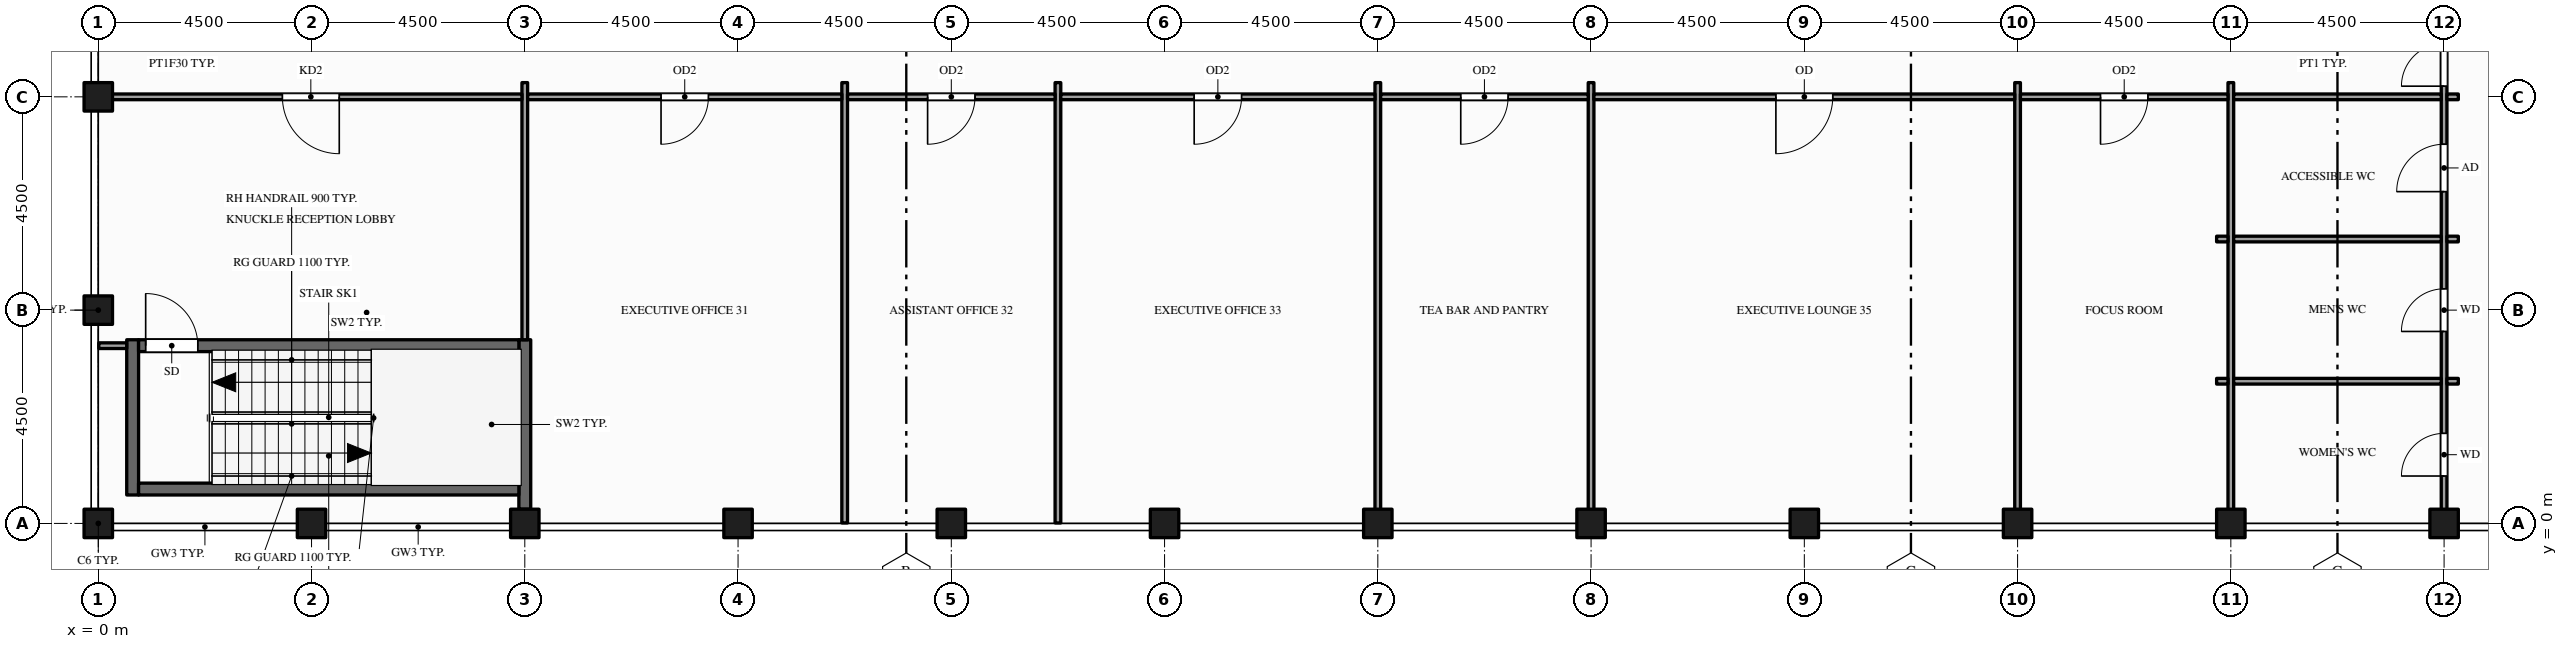
"""IFC4 building model, lengths in metres.
Left out: names, types, materials, properties, quantities, classifications, styles, units other than length and angle.
Written with IfcOpenShell. Run it as: python <this file> out.ifc"""

import sys

from ifc_helpers import new_model, si_unit, direction, frame, frame_2d, origin, origin_2d, place, context, subcontext, project, spatial, rectangle, hollow_rectangle, extrude, element, fill, save


model = new_model("IFC4")
c1 = context("Model", 3, precision=1e-05, world=origin(), true_north=direction((0.0, 1.0)))
c2 = subcontext(c1, "Body", "Model", "MODEL_VIEW")
j1 = project(units=[si_unit("LENGTHUNIT", "METRE"), si_unit("PLANEANGLEUNIT", "RADIAN")], contexts=[c1])
p1 = place(None, origin())
s1 = spatial("IfcSite", under=j1, at=p1, CompositionType="ELEMENT")
p2 = place(p1, origin())
s2 = spatial("IfcBuilding", under=s1, at=p2, CompositionType="ELEMENT")
p3 = place(p2, frame((0.0, 0.0, 332.0)))
s3 = spatial("IfcBuildingStorey", under=s2, at=p3, CompositionType="ELEMENT", Elevation=332.0)
for number, where, z_axis, x_axis in (
    (1, (0.0, 0.0, -0.15), (0.0, 0.0, 1.0), (1.0, 0.0, 0.0)),
    (2, (0.0, 4.5, -0.15), (0.0, 0.0, 1.0), (1.0, 0.0, 0.0)),
    (3, (0.0, 9.0, -0.15), (0.0, 0.0, 1.0), (1.0, 0.0, 0.0)),
    (4, (4.5, 0.0, -0.15), (0.0, 0.0, 1.0), (1.0, 0.0, 0.0)),
    (5, (9.0, 0.0, -0.15), (0.0, 0.0, 1.0), (1.0, 0.0, 0.0)),
    (6, (13.5, 0.0, -0.15), (0.0, 0.0, 1.0), (1.0, 0.0, 0.0)),
    (7, (18.0, 0.0, -0.15), (0.0, 0.0, 1.0), (1.0, 0.0, 0.0)),
    (8, (22.5, 0.0, -0.15), (0.0, 0.0, 1.0), (1.0, 0.0, 0.0)),
    (9, (27.0, 0.0, -0.15), (0.0, 0.0, 1.0), (1.0, 0.0, 0.0)),
    (10, (31.5, 0.0, -0.15), (0.0, 0.0, 1.0), (1.0, 0.0, 0.0)),
    (11, (36.0, 0.0, -0.15), (0.0, 0.0, 1.0), (1.0, 0.0, 0.0)),
    (12, (40.5, 0.0, -0.15), (0.0, 0.0, 1.0), (1.0, 0.0, 0.0)),
    (13, (45.0, 0.0, -0.15), (0.0, 0.0, 1.0), (1.0, 0.0, 0.0)),
    (14, (49.5, 0.0, -0.15), (0.0, 0.0, 1.0), (1.0, 0.0, 0.0)),
):
    element("IfcColumn", number, at=place(p3, frame(where, z_axis=z_axis, x_axis=x_axis)), inside=s3, PredefinedType="COLUMN", context=c2, shape_type="SweptSolid", body=[
        extrude(hollow_rectangle(XDim=0.6, YDim=0.6, WallThickness=0.03, at=origin_2d()), origin(), (0.0, 0.0, 1.0), 4.5),
    ])
p4 = place(p3, frame((0.725, 0.6, 0.0), z_axis=(0.0, 0.0, 1.0), x_axis=(0.0, 1.0, 0.0)))
e15 = element("IfcWall", 15, at=p4, inside=s3, PredefinedType="SHEAR", context=c2, shape_type="SweptSolid", body=[
    extrude(rectangle(XDim=3.275, YDim=0.25, at=frame_2d((1.637, 0.0))), origin(), (0.0, 0.0, 1.0), 4.35),
])
p5 = place(p3, frame((9.0, 0.3, 0.0), z_axis=(0.0, 0.0, 1.0), x_axis=(0.0, 1.0, 0.0)))
e16 = element("IfcWall", 16, at=p5, inside=s3, PredefinedType="SHEAR", context=c2, shape_type="SweptSolid", body=[
    extrude(rectangle(XDim=3.575, YDim=0.25, at=frame_2d((1.788, 0.0))), origin(), (0.0, 0.0, 1.0), 4.35),
])
p6 = place(p3, frame((9.0, 3.875, 0.0), z_axis=(0.0, 0.0, 1.0), x_axis=(0.0, 1.0, 0.0)))
e17 = element("IfcWall", 17, at=p6, inside=s3, PredefinedType="PARTITIONING", context=c2, shape_type="SweptSolid", body=[
    extrude(rectangle(XDim=5.425, YDim=0.12, at=frame_2d((2.712, 0.0))), origin(), (0.0, 0.0, 1.0), 3.359),
])
for number, where, z_axis, x_axis in (
    (18, (15.75, 0.01, 0.0), (0.0, 0.0, 1.0), (0.0, 1.0, 0.0)),
    (19, (20.25, 0.01, 0.0), (0.0, 0.0, 1.0), (0.0, 1.0, 0.0)),
    (20, (27.0, 0.01, 0.0), (0.0, 0.0, 1.0), (0.0, 1.0, 0.0)),
    (21, (31.5, 0.01, 0.0), (0.0, 0.0, 1.0), (0.0, 1.0, 0.0)),
    (22, (40.5, 0.01, 0.0), (0.0, 0.0, 1.0), (0.0, 1.0, 0.0)),
    (23, (45.0, 0.01, 0.0), (0.0, 0.0, 1.0), (0.0, 1.0, 0.0)),
):
    element("IfcWall", number, at=place(p3, frame(where, z_axis=z_axis, x_axis=x_axis)), inside=s3, PredefinedType="PARTITIONING", context=c2, shape_type="SweptSolid", body=[
        extrude(rectangle(XDim=9.29, YDim=0.12, at=frame_2d((4.645, 0.0))), origin(), (0.0, 0.0, 1.0), 3.359),
    ])
p7 = place(p3, frame((49.5, 0.01, 0.0), z_axis=(0.0, 0.0, 1.0), x_axis=(0.0, 1.0, 0.0)))
e24 = element("IfcWall", 24, at=p7, inside=s3, PredefinedType="PARTITIONING", context=c2, shape_type="SweptSolid", body=[
    extrude(rectangle(XDim=22.48, YDim=0.12, at=frame_2d((11.24, 0.0))), origin(), (0.0, 0.0, 1.0), 3.359),
])
p8 = place(p7, frame((9.215, 0.0, 0.0)))
e25 = element("IfcOpeningElement", 25, at=p8, cuts=e24, PredefinedType="OPENING", context=c2, shape_type="SweptSolid", body=[
    extrude(rectangle(XDim=1.8, YDim=2.1, at=frame_2d((0.9, 1.05))), frame((0.0, 0.07, 0.0), z_axis=(0.0, -1.0, 0.0), x_axis=(1.0, 0.0, 0.0)), (0.0, 0.0, 1.0), 0.14),
])
p9 = place(p7, frame((0.99, 0.0, 0.0)))
e26 = element("IfcOpeningElement", 26, at=p9, cuts=e24, PredefinedType="OPENING", context=c2, shape_type="SweptSolid", body=[
    extrude(rectangle(XDim=0.9, YDim=2.1, at=frame_2d((0.45, 1.05))), frame((0.0, 0.07, 0.0), z_axis=(0.0, -1.0, 0.0), x_axis=(1.0, 0.0, 0.0)), (0.0, 0.0, 1.0), 0.14),
])
p10 = place(p7, frame((4.04, 0.0, 0.0)))
e27 = element("IfcOpeningElement", 27, at=p10, cuts=e24, PredefinedType="OPENING", context=c2, shape_type="SweptSolid", body=[
    extrude(rectangle(XDim=0.9, YDim=2.1, at=frame_2d((0.45, 1.05))), frame((0.0, 0.07, 0.0), z_axis=(0.0, -1.0, 0.0), x_axis=(1.0, 0.0, 0.0)), (0.0, 0.0, 1.0), 0.14),
])
p11 = place(p7, frame((6.99, 0.0, 0.0)))
e28 = element("IfcOpeningElement", 28, at=p11, cuts=e24, PredefinedType="OPENING", context=c2, shape_type="SweptSolid", body=[
    extrude(rectangle(XDim=1.0, YDim=2.1, at=frame_2d((0.5, 1.05))), frame((0.0, 0.07, 0.0), z_axis=(0.0, -1.0, 0.0), x_axis=(1.0, 0.0, 0.0)), (0.0, 0.0, 1.0), 0.14),
])
p12 = place(p3, frame((0.85, 0.725, 0.0), z_axis=(0.0, 0.0, 1.0), x_axis=(1.0, 0.0, 0.0)))
e29 = element("IfcWall", 29, at=p12, inside=s3, PredefinedType="SHEAR", context=c2, shape_type="SweptSolid", body=[
    extrude(rectangle(XDim=8.025, YDim=0.25, at=frame_2d((4.012, 0.0))), origin(), (0.0, 0.0, 1.0), 4.35),
])
p13 = place(p3, frame((44.7, 3.0, 0.0), z_axis=(0.0, 0.0, 1.0), x_axis=(1.0, 0.0, 0.0)))
e30 = element("IfcWall", 30, at=p13, inside=s3, PredefinedType="PARTITIONING", context=c2, shape_type="SweptSolid", body=[
    extrude(rectangle(XDim=0.24, YDim=0.12, at=frame_2d((0.12, 0.0))), origin(), (0.0, 0.0, 1.0), 3.359),
])
p14 = place(p3, frame((45.06, 3.0, 0.0), z_axis=(0.0, 0.0, 1.0), x_axis=(1.0, 0.0, 0.0)))
e31 = element("IfcWall", 31, at=p14, inside=s3, PredefinedType="PARTITIONING", context=c2, shape_type="SweptSolid", body=[
    extrude(rectangle(XDim=4.38, YDim=0.12, at=frame_2d((2.19, 0.0))), origin(), (0.0, 0.0, 1.0), 3.359),
])
p15 = place(p3, frame((49.56, 3.0, 0.0), z_axis=(0.0, 0.0, 1.0), x_axis=(1.0, 0.0, 0.0)))
e32 = element("IfcWall", 32, at=p15, inside=s3, PredefinedType="PARTITIONING", context=c2, shape_type="SweptSolid", body=[
    extrude(rectangle(XDim=0.24, YDim=0.12, at=frame_2d((0.12, 0.0))), origin(), (0.0, 0.0, 1.0), 3.359),
])
p16 = place(p3, frame((0.01, 3.75, 0.0), z_axis=(0.0, 0.0, 1.0), x_axis=(1.0, 0.0, 0.0)))
e33 = element("IfcWall", 33, at=p16, inside=s3, PredefinedType="PARTITIONING", context=c2, shape_type="SweptSolid", body=[
    extrude(rectangle(XDim=0.59, YDim=0.12, at=frame_2d((0.295, 0.0))), origin(), (0.0, 0.0, 1.0), 3.672),
])
p17 = place(p3, frame((0.85, 3.75, 0.0), z_axis=(0.0, 0.0, 1.0), x_axis=(1.0, 0.0, 0.0)))
e34 = element("IfcWall", 34, at=p17, inside=s3, PredefinedType="SHEAR", context=c2, shape_type="SweptSolid", body=[
    extrude(rectangle(XDim=8.025, YDim=0.25, at=frame_2d((4.012, 0.0))), origin(), (0.0, 0.0, 1.0), 4.35),
])
p18 = place(p17, frame((0.15, 0.0, 0.0)))
e35 = element("IfcOpeningElement", 35, at=p18, cuts=e34, PredefinedType="OPENING", context=c2, shape_type="SweptSolid", body=[
    extrude(rectangle(XDim=1.1, YDim=2.1, at=frame_2d((0.55, 1.05))), frame((0.0, 0.135, 0.0), z_axis=(0.0, -1.0, 0.0), x_axis=(1.0, 0.0, 0.0)), (0.0, 0.0, 1.0), 0.27),
])
p19 = place(p3, frame((44.7, 6.0, 0.0), z_axis=(0.0, 0.0, 1.0), x_axis=(1.0, 0.0, 0.0)))
e36 = element("IfcWall", 36, at=p19, inside=s3, PredefinedType="PARTITIONING", context=c2, shape_type="SweptSolid", body=[
    extrude(rectangle(XDim=0.24, YDim=0.12, at=frame_2d((0.12, 0.0))), origin(), (0.0, 0.0, 1.0), 3.359),
])
p20 = place(p3, frame((45.06, 6.0, 0.0), z_axis=(0.0, 0.0, 1.0), x_axis=(1.0, 0.0, 0.0)))
e37 = element("IfcWall", 37, at=p20, inside=s3, PredefinedType="PARTITIONING", context=c2, shape_type="SweptSolid", body=[
    extrude(rectangle(XDim=4.38, YDim=0.12, at=frame_2d((2.19, 0.0))), origin(), (0.0, 0.0, 1.0), 3.359),
])
p21 = place(p3, frame((49.56, 6.0, 0.0), z_axis=(0.0, 0.0, 1.0), x_axis=(1.0, 0.0, 0.0)))
e38 = element("IfcWall", 38, at=p21, inside=s3, PredefinedType="PARTITIONING", context=c2, shape_type="SweptSolid", body=[
    extrude(rectangle(XDim=0.24, YDim=0.12, at=frame_2d((0.12, 0.0))), origin(), (0.0, 0.0, 1.0), 3.359),
])
p22 = place(p3, frame((0.01, 9.0, 0.0), z_axis=(0.0, 0.0, 1.0), x_axis=(1.0, 0.0, 0.0)))
e39 = element("IfcWall", 39, at=p22, inside=s3, PredefinedType="PARTITIONING", context=c2, shape_type="SweptSolid", body=[
    extrude(rectangle(XDim=8.93, YDim=0.12, at=frame_2d((4.465, 0.0))), origin(), (0.0, 0.0, 1.0), 3.359),
])
p23 = place(p22, frame((3.875, 0.0, 0.0)))
e40 = element("IfcOpeningElement", 40, at=p23, cuts=e39, PredefinedType="OPENING", context=c2, shape_type="SweptSolid", body=[
    extrude(rectangle(XDim=1.2, YDim=2.1, at=frame_2d((0.6, 1.05))), frame((0.0, 0.07, 0.0), z_axis=(0.0, -1.0, 0.0), x_axis=(1.0, 0.0, 0.0)), (0.0, 0.0, 1.0), 0.14),
])
p24 = place(p3, frame((9.06, 9.0, 0.0), z_axis=(0.0, 0.0, 1.0), x_axis=(1.0, 0.0, 0.0)))
e41 = element("IfcWall", 41, at=p24, inside=s3, PredefinedType="PARTITIONING", context=c2, shape_type="SweptSolid", body=[
    extrude(rectangle(XDim=6.63, YDim=0.12, at=frame_2d((3.315, 0.0))), origin(), (0.0, 0.0, 1.0), 3.359),
])
p25 = place(p24, frame((2.815, 0.0, 0.0)))
e42 = element("IfcOpeningElement", 42, at=p25, cuts=e41, PredefinedType="OPENING", context=c2, shape_type="SweptSolid", body=[
    extrude(rectangle(XDim=1.0, YDim=2.1, at=frame_2d((0.5, 1.05))), frame((0.0, 0.07, 0.0), z_axis=(0.0, -1.0, 0.0), x_axis=(1.0, 0.0, 0.0)), (0.0, 0.0, 1.0), 0.14),
])
p26 = place(p3, frame((15.81, 9.0, 0.0), z_axis=(0.0, 0.0, 1.0), x_axis=(1.0, 0.0, 0.0)))
e43 = element("IfcWall", 43, at=p26, inside=s3, PredefinedType="PARTITIONING", context=c2, shape_type="SweptSolid", body=[
    extrude(rectangle(XDim=4.38, YDim=0.12, at=frame_2d((2.19, 0.0))), origin(), (0.0, 0.0, 1.0), 3.359),
])
p27 = place(p26, frame((1.69, 0.0, 0.0)))
e44 = element("IfcOpeningElement", 44, at=p27, cuts=e43, PredefinedType="OPENING", context=c2, shape_type="SweptSolid", body=[
    extrude(rectangle(XDim=1.0, YDim=2.1, at=frame_2d((0.5, 1.05))), frame((0.0, 0.07, 0.0), z_axis=(0.0, -1.0, 0.0), x_axis=(1.0, 0.0, 0.0)), (0.0, 0.0, 1.0), 0.14),
])
p28 = place(p3, frame((20.31, 9.0, 0.0), z_axis=(0.0, 0.0, 1.0), x_axis=(1.0, 0.0, 0.0)))
e45 = element("IfcWall", 45, at=p28, inside=s3, PredefinedType="PARTITIONING", context=c2, shape_type="SweptSolid", body=[
    extrude(rectangle(XDim=6.63, YDim=0.12, at=frame_2d((3.315, 0.0))), origin(), (0.0, 0.0, 1.0), 3.359),
])
p29 = place(p28, frame((2.815, 0.0, 0.0)))
e46 = element("IfcOpeningElement", 46, at=p29, cuts=e45, PredefinedType="OPENING", context=c2, shape_type="SweptSolid", body=[
    extrude(rectangle(XDim=1.0, YDim=2.1, at=frame_2d((0.5, 1.05))), frame((0.0, 0.07, 0.0), z_axis=(0.0, -1.0, 0.0), x_axis=(1.0, 0.0, 0.0)), (0.0, 0.0, 1.0), 0.14),
])
p30 = place(p3, frame((27.06, 9.0, 0.0), z_axis=(0.0, 0.0, 1.0), x_axis=(1.0, 0.0, 0.0)))
e47 = element("IfcWall", 47, at=p30, inside=s3, PredefinedType="PARTITIONING", context=c2, shape_type="SweptSolid", body=[
    extrude(rectangle(XDim=4.38, YDim=0.12, at=frame_2d((2.19, 0.0))), origin(), (0.0, 0.0, 1.0), 3.359),
])
p31 = place(p30, frame((1.69, 0.0, 0.0)))
e48 = element("IfcOpeningElement", 48, at=p31, cuts=e47, PredefinedType="OPENING", context=c2, shape_type="SweptSolid", body=[
    extrude(rectangle(XDim=1.0, YDim=2.1, at=frame_2d((0.5, 1.05))), frame((0.0, 0.07, 0.0), z_axis=(0.0, -1.0, 0.0), x_axis=(1.0, 0.0, 0.0)), (0.0, 0.0, 1.0), 0.14),
])
p32 = place(p3, frame((31.56, 9.0, 0.0), z_axis=(0.0, 0.0, 1.0), x_axis=(1.0, 0.0, 0.0)))
e49 = element("IfcWall", 49, at=p32, inside=s3, PredefinedType="PARTITIONING", context=c2, shape_type="SweptSolid", body=[
    extrude(rectangle(XDim=8.88, YDim=0.12, at=frame_2d((4.44, 0.0))), origin(), (0.0, 0.0, 1.0), 3.359),
])
p33 = place(p32, frame((3.84, 0.0, 0.0)))
e50 = element("IfcOpeningElement", 50, at=p33, cuts=e49, PredefinedType="OPENING", context=c2, shape_type="SweptSolid", body=[
    extrude(rectangle(XDim=1.2, YDim=2.1, at=frame_2d((0.6, 1.05))), frame((0.0, 0.07, 0.0), z_axis=(0.0, -1.0, 0.0), x_axis=(1.0, 0.0, 0.0)), (0.0, 0.0, 1.0), 0.14),
])
p34 = place(p3, frame((40.56, 9.0, 0.0), z_axis=(0.0, 0.0, 1.0), x_axis=(1.0, 0.0, 0.0)))
e51 = element("IfcWall", 51, at=p34, inside=s3, PredefinedType="PARTITIONING", context=c2, shape_type="SweptSolid", body=[
    extrude(rectangle(XDim=4.38, YDim=0.12, at=frame_2d((2.19, 0.0))), origin(), (0.0, 0.0, 1.0), 3.359),
])
p35 = place(p34, frame((1.69, 0.0, 0.0)))
e52 = element("IfcOpeningElement", 52, at=p35, cuts=e51, PredefinedType="OPENING", context=c2, shape_type="SweptSolid", body=[
    extrude(rectangle(XDim=1.0, YDim=2.1, at=frame_2d((0.5, 1.05))), frame((0.0, 0.07, 0.0), z_axis=(0.0, -1.0, 0.0), x_axis=(1.0, 0.0, 0.0)), (0.0, 0.0, 1.0), 0.14),
])
p36 = place(p3, frame((45.06, 9.0, 0.0), z_axis=(0.0, 0.0, 1.0), x_axis=(1.0, 0.0, 0.0)))
e53 = element("IfcWall", 53, at=p36, inside=s3, PredefinedType="PARTITIONING", context=c2, shape_type="SweptSolid", body=[
    extrude(rectangle(XDim=4.38, YDim=0.12, at=frame_2d((2.19, 0.0))), origin(), (0.0, 0.0, 1.0), 3.359),
])
p37 = place(p3, frame((49.56, 9.0, 0.0), z_axis=(0.0, 0.0, 1.0), x_axis=(1.0, 0.0, 0.0)))
e54 = element("IfcWall", 54, at=p37, inside=s3, PredefinedType="PARTITIONING", context=c2, shape_type="SweptSolid", body=[
    extrude(rectangle(XDim=0.24, YDim=0.12, at=frame_2d((0.12, 0.0))), origin(), (0.0, 0.0, 1.0), 3.359),
])
p38 = place(p8, origin())
e55 = element("IfcDoor", 55, at=p38, inside=s3, OperationType="DOUBLE_DOOR_SINGLE_SWING", PredefinedType="DOOR", context=c2, shape_type="SweptSolid", body=[
    extrude(rectangle(XDim=1.8, YDim=2.1, at=frame_2d((0.9, 1.05))), frame((0.0, 0.025, 0.0), z_axis=(0.0, -1.0, 0.0), x_axis=(1.0, 0.0, 0.0)), (0.0, 0.0, 1.0), 0.05),
])
fill(e25, e55)
p39 = place(p18, origin())
e56 = element("IfcDoor", 56, at=p39, inside=s3, OperationType="SINGLE_SWING_LEFT", PredefinedType="DOOR", context=c2, shape_type="SweptSolid", body=[
    extrude(rectangle(XDim=1.1, YDim=2.1, at=frame_2d((0.55, 1.05))), frame((0.0, 0.025, 0.0), z_axis=(0.0, -1.0, 0.0), x_axis=(1.0, 0.0, 0.0)), (0.0, 0.0, 1.0), 0.05),
])
fill(e35, e56)
p40 = place(p23, origin())
e57 = element("IfcDoor", 57, at=p40, inside=s3, OperationType="SINGLE_SWING_RIGHT", PredefinedType="DOOR", context=c2, shape_type="SweptSolid", body=[
    extrude(rectangle(XDim=1.2, YDim=2.1, at=frame_2d((0.6, 1.05))), frame((0.0, 0.025, 0.0), z_axis=(0.0, -1.0, 0.0), x_axis=(1.0, 0.0, 0.0)), (0.0, 0.0, 1.0), 0.05),
])
fill(e40, e57)
p41 = place(p25, origin())
e58 = element("IfcDoor", 58, at=p41, inside=s3, OperationType="SINGLE_SWING_LEFT", PredefinedType="DOOR", context=c2, shape_type="SweptSolid", body=[
    extrude(rectangle(XDim=1.0, YDim=2.1, at=frame_2d((0.5, 1.05))), frame((0.0, 0.025, 0.0), z_axis=(0.0, -1.0, 0.0), x_axis=(1.0, 0.0, 0.0)), (0.0, 0.0, 1.0), 0.05),
])
fill(e42, e58)
p42 = place(p27, origin())
e59 = element("IfcDoor", 59, at=p42, inside=s3, OperationType="SINGLE_SWING_LEFT", PredefinedType="DOOR", context=c2, shape_type="SweptSolid", body=[
    extrude(rectangle(XDim=1.0, YDim=2.1, at=frame_2d((0.5, 1.05))), frame((0.0, 0.025, 0.0), z_axis=(0.0, -1.0, 0.0), x_axis=(1.0, 0.0, 0.0)), (0.0, 0.0, 1.0), 0.05),
])
fill(e44, e59)
p43 = place(p29, origin())
e60 = element("IfcDoor", 60, at=p43, inside=s3, OperationType="SINGLE_SWING_LEFT", PredefinedType="DOOR", context=c2, shape_type="SweptSolid", body=[
    extrude(rectangle(XDim=1.0, YDim=2.1, at=frame_2d((0.5, 1.05))), frame((0.0, 0.025, 0.0), z_axis=(0.0, -1.0, 0.0), x_axis=(1.0, 0.0, 0.0)), (0.0, 0.0, 1.0), 0.05),
])
fill(e46, e60)
p44 = place(p31, origin())
e61 = element("IfcDoor", 61, at=p44, inside=s3, OperationType="SINGLE_SWING_LEFT", PredefinedType="DOOR", context=c2, shape_type="SweptSolid", body=[
    extrude(rectangle(XDim=1.0, YDim=2.1, at=frame_2d((0.5, 1.05))), frame((0.0, 0.025, 0.0), z_axis=(0.0, -1.0, 0.0), x_axis=(1.0, 0.0, 0.0)), (0.0, 0.0, 1.0), 0.05),
])
fill(e48, e61)
p45 = place(p33, origin())
e62 = element("IfcDoor", 62, at=p45, inside=s3, OperationType="SINGLE_SWING_LEFT", PredefinedType="DOOR", context=c2, shape_type="SweptSolid", body=[
    extrude(rectangle(XDim=1.2, YDim=2.1, at=frame_2d((0.6, 1.05))), frame((0.0, 0.025, 0.0), z_axis=(0.0, -1.0, 0.0), x_axis=(1.0, 0.0, 0.0)), (0.0, 0.0, 1.0), 0.05),
])
fill(e50, e62)
p46 = place(p35, origin())
e63 = element("IfcDoor", 63, at=p46, inside=s3, OperationType="SINGLE_SWING_LEFT", PredefinedType="DOOR", context=c2, shape_type="SweptSolid", body=[
    extrude(rectangle(XDim=1.0, YDim=2.1, at=frame_2d((0.5, 1.05))), frame((0.0, 0.025, 0.0), z_axis=(0.0, -1.0, 0.0), x_axis=(1.0, 0.0, 0.0)), (0.0, 0.0, 1.0), 0.05),
])
fill(e52, e63)
p47 = place(p9, origin())
e64 = element("IfcDoor", 64, at=p47, inside=s3, OperationType="SINGLE_SWING_LEFT", PredefinedType="DOOR", context=c2, shape_type="SweptSolid", body=[
    extrude(rectangle(XDim=0.9, YDim=2.1, at=frame_2d((0.45, 1.05))), frame((0.0, 0.025, 0.0), z_axis=(0.0, -1.0, 0.0), x_axis=(1.0, 0.0, 0.0)), (0.0, 0.0, 1.0), 0.05),
])
fill(e26, e64)
p48 = place(p10, origin())
e65 = element("IfcDoor", 65, at=p48, inside=s3, OperationType="SINGLE_SWING_LEFT", PredefinedType="DOOR", context=c2, shape_type="SweptSolid", body=[
    extrude(rectangle(XDim=0.9, YDim=2.1, at=frame_2d((0.45, 1.05))), frame((0.0, 0.025, 0.0), z_axis=(0.0, -1.0, 0.0), x_axis=(1.0, 0.0, 0.0)), (0.0, 0.0, 1.0), 0.05),
])
fill(e27, e65)
p49 = place(p11, origin())
e66 = element("IfcDoor", 66, at=p49, inside=s3, OperationType="SINGLE_SWING_LEFT", PredefinedType="DOOR", context=c2, shape_type="SweptSolid", body=[
    extrude(rectangle(XDim=1.0, YDim=2.1, at=frame_2d((0.5, 1.05))), frame((0.0, 0.025, 0.0), z_axis=(0.0, -1.0, 0.0), x_axis=(1.0, 0.0, 0.0)), (0.0, 0.0, 1.0), 0.05),
])
fill(e28, e66)
save(model, sys.argv[1])
